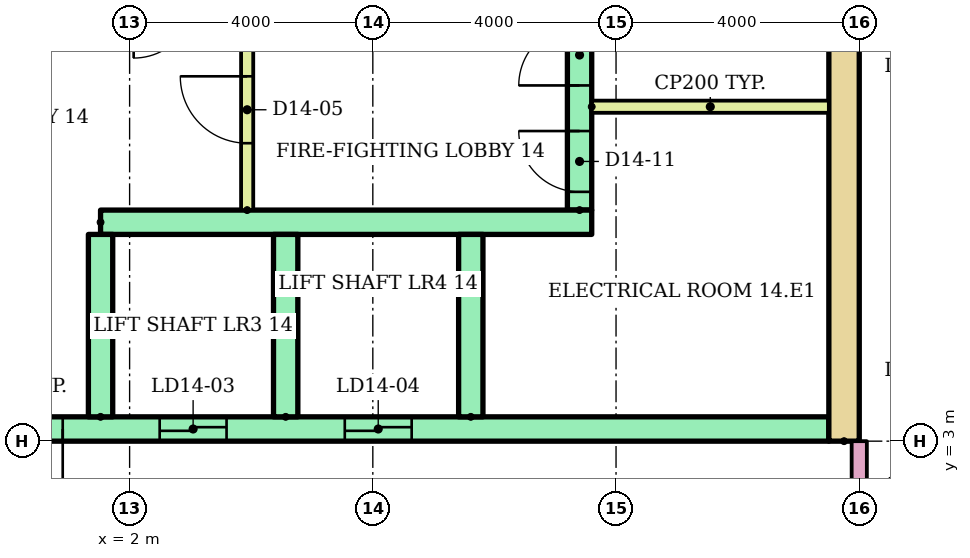
"""IFC4 building model, lengths in metres.
Left out: names, types, materials, properties, quantities, classifications, styles, units other than length and angle.
Written with IfcOpenShell. Run it as: python <this file> out.ifc"""

import sys

from ifc_helpers import new_model, si_unit, direction, frame, frame_2d, origin, place, context, subcontext, project, spatial, rectangle, extrude, element, fill, save


model = new_model("IFC4")
c1 = context("Model", 3, precision=1e-05, world=origin(), true_north=direction((0.0, 1.0)))
c2 = subcontext(c1, "Body", "Model", "MODEL_VIEW")
j1 = project(units=[si_unit("LENGTHUNIT", "METRE"), si_unit("PLANEANGLEUNIT", "RADIAN")], contexts=[c1])
p1 = place(None, origin())
s1 = spatial("IfcSite", under=j1, at=p1, CompositionType="ELEMENT")
p2 = place(p1, origin())
s2 = spatial("IfcBuilding", under=s1, at=p2, CompositionType="ELEMENT")
p3 = place(p2, frame((0.0, 0.0, 54.4)))
s3 = spatial("IfcBuildingStorey", under=s2, at=p3, CompositionType="ELEMENT", Elevation=54.4)
p4 = place(p3, frame((13.75, 3.0, 0.0), z_axis=(0.0, 0.0, 1.0), x_axis=(0.0, 1.0, 0.0)))
e1 = element("IfcWall", 1, at=p4, inside=s3, PredefinedType="SHEAR", context=c2, shape_type="SweptSolid", body=[
    extrude(rectangle(XDim=17.0, YDim=0.5, at=frame_2d((8.5, 0.0))), origin(), (0.0, 0.0, 1.0), 2.92),
])
p5 = place(p3, frame((9.4, 6.8, 0.0), z_axis=(0.0, 0.0, 1.0), x_axis=(0.0, 1.0, 0.0)))
e2 = element("IfcWall", 2, at=p5, inside=s3, PredefinedType="SHEAR", context=c2, shape_type="SweptSolid", body=[
    extrude(rectangle(XDim=12.7, YDim=0.4, at=frame_2d((6.35, 0.0))), origin(), (0.0, 0.0, 1.0), 2.92),
])
p6 = place(p5, frame((0.3, 0.0, 0.0)))
e3 = element("IfcOpeningElement", 3, at=p6, cuts=e2, PredefinedType="OPENING", context=c2, shape_type="SweptSolid", body=[
    extrude(rectangle(XDim=1.0, YDim=2.1, at=frame_2d((0.5, 1.05))), frame((0.0, 0.21, 0.0), z_axis=(0.0, -1.0, 0.0), x_axis=(1.0, 0.0, 0.0)), (0.0, 0.0, 1.0), 0.42),
])
p7 = place(p5, frame((2.05, 0.0, 0.0)))
e4 = element("IfcOpeningElement", 4, at=p7, cuts=e2, PredefinedType="OPENING", context=c2, shape_type="SweptSolid", body=[
    extrude(rectangle(XDim=1.0, YDim=2.1, at=frame_2d((0.5, 1.05))), frame((0.0, 0.21, 0.0), z_axis=(0.0, -1.0, 0.0), x_axis=(1.0, 0.0, 0.0)), (0.0, 0.0, 1.0), 0.42),
])
p8 = place(p5, frame((7.925, 0.0, 0.0)))
e5 = element("IfcOpeningElement", 5, at=p8, cuts=e2, PredefinedType="OPENING", context=c2, shape_type="SweptSolid", body=[
    extrude(rectangle(XDim=1.0, YDim=2.1, at=frame_2d((0.5, 1.05))), frame((0.0, 0.21, 0.0), z_axis=(0.0, -1.0, 0.0), x_axis=(1.0, 0.0, 0.0)), (0.0, 0.0, 1.0), 0.42),
])
p9 = place(p3, frame((-13.5, 3.2, 0.0)))
e6 = element("IfcWall", 6, at=p9, inside=s3, PredefinedType="SHEAR", context=c2, shape_type="SweptSolid", body=[
    extrude(rectangle(XDim=27.0, YDim=0.4, at=frame_2d((13.5, 0.0))), origin(), (0.0, 0.0, 1.0), 2.92),
])
p10 = place(p9, frame((6.861, 0.0, 0.0)))
e7 = element("IfcOpeningElement", 7, at=p10, cuts=e6, PredefinedType="OPENING", context=c2, shape_type="SweptSolid", body=[
    extrude(rectangle(XDim=1.1, YDim=2.1, at=frame_2d((0.55, 1.05))), frame((0.0, 0.21, 0.0), z_axis=(0.0, -1.0, 0.0), x_axis=(1.0, 0.0, 0.0)), (0.0, 0.0, 1.0), 0.42),
])
p11 = place(p9, frame((9.906, 0.0, 0.0)))
e8 = element("IfcOpeningElement", 8, at=p11, cuts=e6, PredefinedType="OPENING", context=c2, shape_type="SweptSolid", body=[
    extrude(rectangle(XDim=1.1, YDim=2.1, at=frame_2d((0.55, 1.05))), frame((0.0, 0.21, 0.0), z_axis=(0.0, -1.0, 0.0), x_axis=(1.0, 0.0, 0.0)), (0.0, 0.0, 1.0), 0.42),
])
p12 = place(p9, frame((15.994, 0.0, 0.0)))
e9 = element("IfcOpeningElement", 9, at=p12, cuts=e6, PredefinedType="OPENING", context=c2, shape_type="SweptSolid", body=[
    extrude(rectangle(XDim=1.1, YDim=2.1, at=frame_2d((0.55, 1.05))), frame((0.0, 0.21, 0.0), z_axis=(0.0, -1.0, 0.0), x_axis=(1.0, 0.0, 0.0)), (0.0, 0.0, 1.0), 0.42),
])
p13 = place(p9, frame((19.039, 0.0, 0.0)))
e10 = element("IfcOpeningElement", 10, at=p13, cuts=e6, PredefinedType="OPENING", context=c2, shape_type="SweptSolid", body=[
    extrude(rectangle(XDim=1.1, YDim=2.1, at=frame_2d((0.55, 1.05))), frame((0.0, 0.21, 0.0), z_axis=(0.0, -1.0, 0.0), x_axis=(1.0, 0.0, 0.0)), (0.0, 0.0, 1.0), 0.42),
])
p14 = place(p9, frame((12.6, 0.0, 0.0)))
e11 = element("IfcOpeningElement", 11, at=p14, cuts=e6, PredefinedType="OPENING", context=c2, shape_type="SweptSolid", body=[
    extrude(rectangle(XDim=1.8, YDim=2.1, at=frame_2d((0.9, 1.05))), frame((0.0, 0.21, 0.0), z_axis=(0.0, -1.0, 0.0), x_axis=(1.0, 0.0, 0.0)), (0.0, 0.0, 1.0), 0.42),
])
p15 = place(p3, frame((1.522, 6.6, 0.0)))
e12 = element("IfcWall", 12, at=p15, inside=s3, PredefinedType="SHEAR", context=c2, shape_type="SweptSolid", body=[
    extrude(rectangle(XDim=8.078, YDim=0.4, at=frame_2d((4.039, 0.0))), origin(), (0.0, 0.0, 1.0), 2.92),
])
for number, where, z_axis, x_axis in (
    (13, (1.522, 3.4, 0.0), (0.0, 0.0, 1.0), (0.0, 1.0, 0.0)),
    (14, (4.567, 3.4, 0.0), (0.0, 0.0, 1.0), (0.0, 1.0, 0.0)),
    (15, (7.611, 3.4, 0.0), (0.0, 0.0, 1.0), (0.0, 1.0, 0.0)),
):
    element("IfcWall", number, at=place(p3, frame(where, z_axis=z_axis, x_axis=x_axis)), inside=s3, PredefinedType="SHEAR", context=c2, shape_type="SweptSolid", body=[
        extrude(rectangle(XDim=3.0, YDim=0.4, at=frame_2d((1.5, 0.0))), origin(), (0.0, 0.0, 1.0), 2.92),
    ])
p16 = place(p3, frame((3.933, 6.8, 0.0), z_axis=(0.0, 0.0, 1.0), x_axis=(0.0, 1.0, 0.0)))
e16 = element("IfcWall", 16, at=p16, inside=s3, PredefinedType="PARTITIONING", context=c2, shape_type="SweptSolid", body=[
    extrude(rectangle(XDim=3.3, YDim=0.2, at=frame_2d((1.65, 0.0))), origin(), (0.0, 0.0, 1.0), 2.92),
])
p17 = place(p16, frame((1.1, 0.0, 0.0)))
e17 = element("IfcOpeningElement", 17, at=p17, cuts=e16, PredefinedType="OPENING", context=c2, shape_type="SweptSolid", body=[
    extrude(rectangle(XDim=1.1, YDim=2.1, at=frame_2d((0.55, 1.05))), frame((0.0, 0.11, 0.0), z_axis=(0.0, -1.0, 0.0), x_axis=(1.0, 0.0, 0.0)), (0.0, 0.0, 1.0), 0.22),
])
p18 = place(p3, frame((9.6, 8.5, 0.0)))
e18 = element("IfcWall", 18, at=p18, inside=s3, PredefinedType="PARTITIONING", context=c2, shape_type="SweptSolid", body=[
    extrude(rectangle(XDim=3.9, YDim=0.2, at=frame_2d((1.95, 0.0))), origin(), (0.0, 0.0, 1.0), 2.92),
])
p19 = place(p3, frame((14.0, 1.4, 0.0), z_axis=(0.0, 0.0, 1.0), x_axis=(0.0, 1.0, 0.0)))
e19 = element("IfcWall", 19, at=p19, inside=s3, PredefinedType="PARTITIONING", context=c2, shape_type="SweptSolid", body=[
    extrude(rectangle(XDim=1.6, YDim=0.25, at=frame_2d((0.8, 0.0))), origin(), (0.0, 0.0, 1.0), 2.4),
])
p20 = place(p12, origin())
e20 = element("IfcDoor", 20, at=p20, inside=s3, OperationType="SLIDING_TO_LEFT", PredefinedType="DOOR", context=c2, shape_type="SweptSolid", body=[
    extrude(rectangle(XDim=1.1, YDim=2.1, at=frame_2d((0.55, 1.05))), frame((0.0, 0.025, 0.0), z_axis=(0.0, -1.0, 0.0), x_axis=(1.0, 0.0, 0.0)), (0.0, 0.0, 1.0), 0.05),
])
fill(e9, e20)
p21 = place(p13, origin())
e21 = element("IfcDoor", 21, at=p21, inside=s3, OperationType="SLIDING_TO_LEFT", PredefinedType="DOOR", context=c2, shape_type="SweptSolid", body=[
    extrude(rectangle(XDim=1.1, YDim=2.1, at=frame_2d((0.55, 1.05))), frame((0.0, 0.025, 0.0), z_axis=(0.0, -1.0, 0.0), x_axis=(1.0, 0.0, 0.0)), (0.0, 0.0, 1.0), 0.05),
])
fill(e10, e21)
p22 = place(p14, frame((1.8, 0.0, 0.0), z_axis=(0.0, 0.0, 1.0), x_axis=(-1.0, 0.0, 0.0)))
e22 = element("IfcDoor", 22, at=p22, inside=s3, OperationType="DOUBLE_DOOR_SINGLE_SWING", PredefinedType="DOOR", context=c2, shape_type="SweptSolid", body=[
    extrude(rectangle(XDim=1.8, YDim=2.1, at=frame_2d((0.9, 1.05))), frame((0.0, 0.025, 0.0), z_axis=(0.0, -1.0, 0.0), x_axis=(1.0, 0.0, 0.0)), (0.0, 0.0, 1.0), 0.05),
])
fill(e11, e22)
p23 = place(p17, origin())
e23 = element("IfcDoor", 23, at=p23, inside=s3, OperationType="SINGLE_SWING_RIGHT", PredefinedType="DOOR", context=c2, shape_type="SweptSolid", body=[
    extrude(rectangle(XDim=1.1, YDim=2.1, at=frame_2d((0.55, 1.05))), frame((0.0, 0.025, 0.0), z_axis=(0.0, -1.0, 0.0), x_axis=(1.0, 0.0, 0.0)), (0.0, 0.0, 1.0), 0.05),
])
fill(e17, e23)
p24 = place(p6, origin())
e24 = element("IfcDoor", 24, at=p24, inside=s3, OperationType="SINGLE_SWING_RIGHT", PredefinedType="DOOR", context=c2, shape_type="SweptSolid", body=[
    extrude(rectangle(XDim=1.0, YDim=2.1, at=frame_2d((0.5, 1.05))), frame((0.0, 0.025, 0.0), z_axis=(0.0, -1.0, 0.0), x_axis=(1.0, 0.0, 0.0)), (0.0, 0.0, 1.0), 0.05),
])
fill(e3, e24)
p25 = place(p7, origin())
e25 = element("IfcDoor", 25, at=p25, inside=s3, OperationType="SINGLE_SWING_LEFT", PredefinedType="DOOR", context=c2, shape_type="SweptSolid", body=[
    extrude(rectangle(XDim=1.0, YDim=2.1, at=frame_2d((0.5, 1.05))), frame((0.0, 0.025, 0.0), z_axis=(0.0, -1.0, 0.0), x_axis=(1.0, 0.0, 0.0)), (0.0, 0.0, 1.0), 0.05),
])
fill(e4, e25)
save(model, sys.argv[1])
